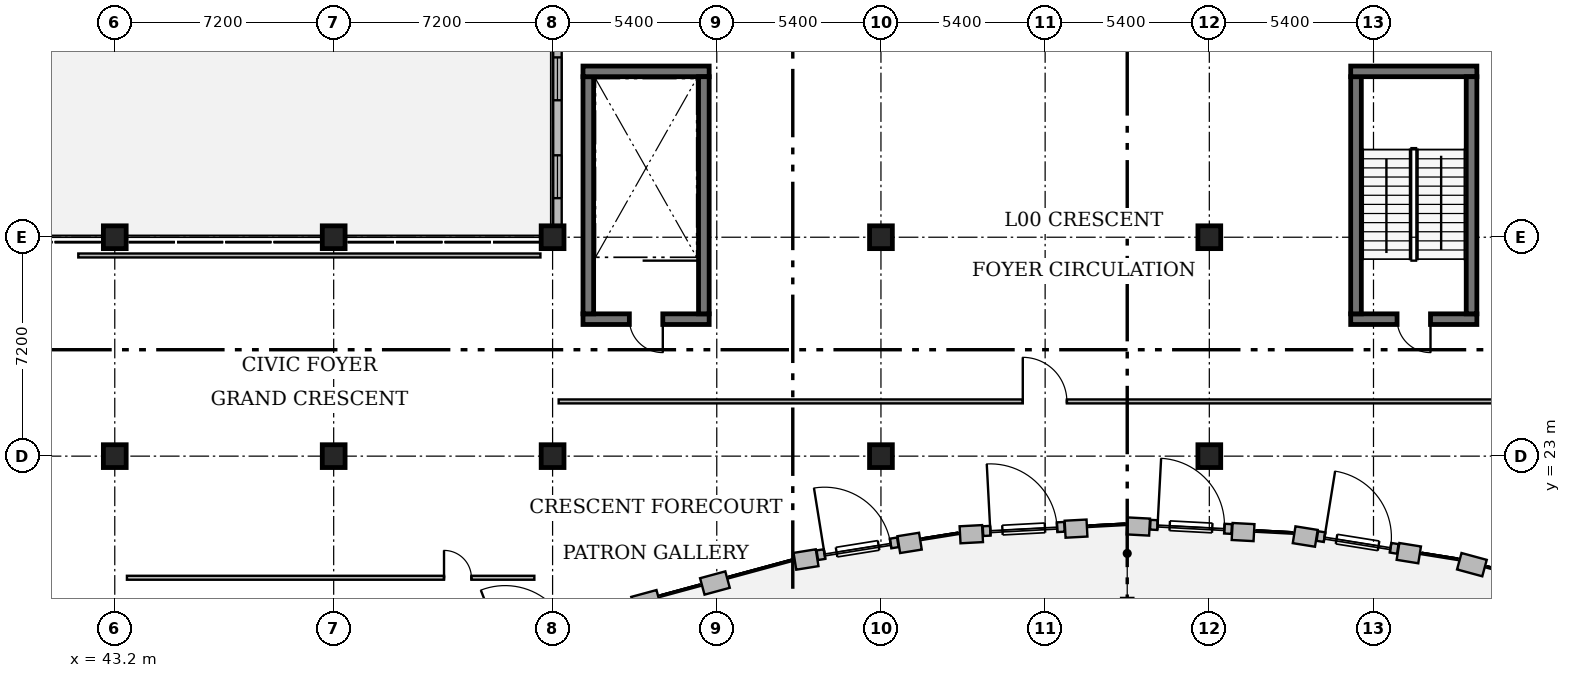
"""IFC4 building model, lengths in metres.
Left out: names, types, materials, properties, quantities, classifications, styles, units other than length and angle.
Written with IfcOpenShell. Run it as: python <this file> out.ifc"""

import sys

from ifc_helpers import new_model, si_unit, direction, frame, frame_2d, origin, origin_2d, place, context, subcontext, project, spatial, rectangle, circle, extrude, element, fill, save


model = new_model("IFC4")
c1 = context("Model", 3, precision=1e-05, world=origin(), true_north=direction((0.0, 1.0)))
c2 = subcontext(c1, "Body", "Model", "MODEL_VIEW")
j1 = project(units=[si_unit("LENGTHUNIT", "METRE"), si_unit("PLANEANGLEUNIT", "RADIAN")], contexts=[c1])
p1 = place(None, origin())
s1 = spatial("IfcSite", under=j1, at=p1, CompositionType="ELEMENT")
p2 = place(p1, origin())
s2 = spatial("IfcBuilding", under=s1, at=p2, CompositionType="ELEMENT")
p3 = place(p2, origin())
s3 = spatial("IfcBuildingStorey", under=s2, at=p3, CompositionType="ELEMENT", Elevation=0.0)
for number, where, z_axis, x_axis in (
    (1, (68.4, 23.0, 0.0), (0.0, 0.0, 1.0), (1.0, 0.0, 0.0)),
    (2, (68.4, 30.2, 0.0), (0.0, 0.0, 1.0), (1.0, 0.0, 0.0)),
    (3, (79.2, 23.0, 0.0), (0.0, 0.0, 1.0), (1.0, 0.0, 0.0)),
    (4, (79.2, 30.2, 0.0), (0.0, 0.0, 1.0), (1.0, 0.0, 0.0)),
    (5, (43.2, 23.0, 0.0), (0.0, 0.0, 1.0), (1.0, 0.0, 0.0)),
    (6, (43.2, 30.2, 0.0), (0.0, 0.0, 1.0), (1.0, 0.0, 0.0)),
    (7, (50.4, 23.0, 0.0), (0.0, 0.0, 1.0), (1.0, 0.0, 0.0)),
    (8, (50.4, 30.2, 0.0), (0.0, 0.0, 1.0), (1.0, 0.0, 0.0)),
    (9, (57.6, 23.0, 0.0), (0.0, 0.0, 1.0), (1.0, 0.0, 0.0)),
    (10, (57.6, 30.2, 0.0), (0.0, 0.0, 1.0), (1.0, 0.0, 0.0)),
):
    element("IfcColumn", number, at=place(p3, frame(where, z_axis=z_axis, x_axis=x_axis)), inside=s3, PredefinedType="COLUMN", context=c2, shape_type="SweptSolid", body=[
        extrude(circle(Radius=0.375, at=origin_2d()), origin(), (0.0, 0.0, 1.0), 4.8),
    ])
p4 = place(p3, frame((88.0, 27.505, 0.0), z_axis=(0.0, 0.0, 1.0), x_axis=(-1.0, 0.0, 0.0)))
e11 = element("IfcWall", 11, at=p4, inside=s3, PredefinedType="SOLIDWALL", context=c2, shape_type="SweptSolid", body=[
    extrude(rectangle(XDim=4.15, YDim=0.35, at=frame_2d((2.075, 0.0))), origin(), (0.0, 0.0, 1.0), 4.8),
])
p5 = place(p4, frame((1.525, 0.0, 0.0)))
e12 = element("IfcOpeningElement", 12, at=p5, cuts=e11, PredefinedType="OPENING", context=c2, shape_type="SweptSolid", body=[
    extrude(rectangle(XDim=1.1, YDim=2.15, at=frame_2d((0.55, 1.075))), frame((0.0, 0.195, 0.0), z_axis=(0.0, -1.0, 0.0), x_axis=(1.0, 0.0, 0.0)), (0.0, 0.0, 1.0), 0.39),
])
p6 = place(p3, frame((84.025, 27.68, 0.0), z_axis=(0.0, 0.0, 1.0), x_axis=(0.0, 1.0, 0.0)))
e13 = element("IfcWall", 13, at=p6, inside=s3, PredefinedType="SOLIDWALL", context=c2, shape_type="SweptSolid", body=[
    extrude(rectangle(XDim=7.8, YDim=0.35, at=frame_2d((3.9, 0.0))), origin(), (0.0, 0.0, 1.0), 4.8),
])
p7 = place(p3, frame((83.85, 35.655, 0.0), z_axis=(0.0, 0.0, 1.0), x_axis=(1.0, 0.0, 0.0)))
e14 = element("IfcWall", 14, at=p7, inside=s3, PredefinedType="SOLIDWALL", context=c2, shape_type="SweptSolid", body=[
    extrude(rectangle(XDim=4.15, YDim=0.35, at=frame_2d((2.075, 0.0))), origin(), (0.0, 0.0, 1.0), 4.8),
])
p8 = place(p3, frame((87.825, 35.48, 0.0), z_axis=(0.0, 0.0, 1.0), x_axis=(0.0, -1.0, 0.0)))
e15 = element("IfcWall", 15, at=p8, inside=s3, PredefinedType="SOLIDWALL", context=c2, shape_type="SweptSolid", body=[
    extrude(rectangle(XDim=7.8, YDim=0.35, at=frame_2d((3.9, 0.0))), origin(), (0.0, 0.0, 1.0), 4.8),
])
p9 = place(p3, frame((62.75, 27.505, 0.0), z_axis=(0.0, 0.0, 1.0), x_axis=(-1.0, 0.0, 0.0)))
e16 = element("IfcWall", 16, at=p9, inside=s3, PredefinedType="SOLIDWALL", context=c2, shape_type="SweptSolid", body=[
    extrude(rectangle(XDim=4.15, YDim=0.35, at=frame_2d((2.075, 0.0))), origin(), (0.0, 0.0, 1.0), 4.54),
])
p10 = place(p9, frame((1.525, 0.0, 0.0)))
e17 = element("IfcOpeningElement", 17, at=p10, cuts=e16, PredefinedType="OPENING", context=c2, shape_type="SweptSolid", body=[
    extrude(rectangle(XDim=1.1, YDim=2.15, at=frame_2d((0.55, 1.075))), frame((0.0, 0.195, 0.0), z_axis=(0.0, -1.0, 0.0), x_axis=(1.0, 0.0, 0.0)), (0.0, 0.0, 1.0), 0.39),
])
p11 = place(p3, frame((58.775, 27.68, 0.0), z_axis=(0.0, 0.0, 1.0), x_axis=(0.0, 1.0, 0.0)))
e18 = element("IfcWall", 18, at=p11, inside=s3, PredefinedType="SOLIDWALL", context=c2, shape_type="SweptSolid", body=[
    extrude(rectangle(XDim=7.8, YDim=0.35, at=frame_2d((3.9, 0.0))), origin(), (0.0, 0.0, 1.0), 4.54),
])
p12 = place(p3, frame((58.6, 35.655, 0.0), z_axis=(0.0, 0.0, 1.0), x_axis=(1.0, 0.0, 0.0)))
e19 = element("IfcWall", 19, at=p12, inside=s3, PredefinedType="SOLIDWALL", context=c2, shape_type="SweptSolid", body=[
    extrude(rectangle(XDim=4.15, YDim=0.35, at=frame_2d((2.075, 0.0))), origin(), (0.0, 0.0, 1.0), 4.54),
])
p13 = place(p3, frame((62.575, 35.48, 0.0), z_axis=(0.0, 0.0, 1.0), x_axis=(0.0, -1.0, 0.0)))
e20 = element("IfcWall", 20, at=p13, inside=s3, PredefinedType="SOLIDWALL", context=c2, shape_type="SweptSolid", body=[
    extrude(rectangle(XDim=7.8, YDim=0.35, at=frame_2d((3.9, 0.0))), origin(), (0.0, 0.0, 1.0), 4.54),
])
p14 = place(p3, frame((60.261, 18.1, 0.0), z_axis=(0.0, 0.0, 1.0), x_axis=(0.965071022865, 0.261988398266, 0.0)))
e21 = element("IfcWall", 21, at=p14, inside=s3, PredefinedType="SOLIDWALL", context=c2, shape_type="SweptSolid", body=[
    extrude(rectangle(XDim=0.86, YDim=0.56, at=frame_2d((0.43, 0.0))), origin(), (0.0, 0.0, 1.0), 4.54),
])
p15 = place(p3, frame((62.524, 18.715, 0.0), z_axis=(0.0, 0.0, 1.0), x_axis=(0.965123305847, 0.261795730506, 0.0)))
e22 = element("IfcWall", 22, at=p15, inside=s3, PredefinedType="SOLIDWALL", context=c2, shape_type="SweptSolid", body=[
    extrude(rectangle(XDim=0.86, YDim=0.56, at=frame_2d((0.43, 0.0))), origin(), (0.0, 0.0, 1.0), 4.54),
])
p16 = place(p3, frame((65.57, 19.542, 0.0), z_axis=(0.0, 0.0, 1.0), x_axis=(0.987374648009, 0.158402349948, 0.0)))
e23 = element("IfcWall", 23, at=p16, inside=s3, PredefinedType="SOLIDWALL", context=c2, shape_type="SweptSolid", body=[
    extrude(rectangle(XDim=0.74, YDim=0.56, at=frame_2d((0.37, 0.0))), origin(), (0.0, 0.0, 1.0), 4.54),
])
p17 = place(p3, frame((68.987, 20.09, 0.0), z_axis=(0.0, 0.0, 1.0), x_axis=(0.98738343789, 0.158347549964, 0.0)))
e24 = element("IfcWall", 24, at=p17, inside=s3, PredefinedType="SOLIDWALL", context=c2, shape_type="SweptSolid", body=[
    extrude(rectangle(XDim=0.72, YDim=0.56, at=frame_2d((0.36, 0.0))), origin(), (0.0, 0.0, 1.0), 4.54),
])
p18 = place(p3, frame((66.308, 19.741, 0.0), z_axis=(0.0, 0.0, 1.0), x_axis=(0.987384856389, 0.158338704595, 0.0)))
e25 = element("IfcWall", 25, at=p18, inside=s3, PredefinedType="SOLIDWALL", context=c2, shape_type="SweptSolid", body=[
    extrude(rectangle(XDim=2.68, YDim=0.32, at=frame_2d((1.34, 0.0))), origin(), (0.0, 0.0, 1.0), 4.54),
])
p19 = place(p18, frame((0.64, 0.0, 2.58)))
e26 = element("IfcOpeningElement", 26, at=p19, cuts=e25, PredefinedType="OPENING", context=c2, shape_type="SweptSolid", body=[
    extrude(rectangle(XDim=1.4, YDim=1.8, at=frame_2d((0.7, 0.9))), frame((0.0, 0.18, 0.0), z_axis=(0.0, -1.0, 0.0), x_axis=(1.0, 0.0, 0.0)), (0.0, 0.0, 1.0), 0.36),
])
p20 = place(p18, frame((0.24, 0.0, 0.0)))
e27 = element("IfcOpeningElement", 27, at=p20, cuts=e25, PredefinedType="OPENING", context=c2, shape_type="SweptSolid", body=[
    extrude(rectangle(XDim=2.2, YDim=2.5, at=frame_2d((1.1, 1.25))), frame((0.0, 0.18, 0.0), z_axis=(0.0, -1.0, 0.0), x_axis=(1.0, 0.0, 0.0)), (0.0, 0.0, 1.0), 0.36),
])
p21 = place(p3, frame((71.002, 20.413, 0.0), z_axis=(0.0, 0.0, 1.0), x_axis=(0.998588513738, 0.053112900797, 0.0)))
e28 = element("IfcWall", 28, at=p21, inside=s3, PredefinedType="SOLIDWALL", context=c2, shape_type="SweptSolid", body=[
    extrude(rectangle(XDim=0.74, YDim=0.56, at=frame_2d((0.37, 0.0))), origin(), (0.0, 0.0, 1.0), 4.54),
])
p22 = place(p3, frame((74.457, 20.596, 0.0), z_axis=(0.0, 0.0, 1.0), x_axis=(0.998582006611, 0.05323510188, 0.0)))
e29 = element("IfcWall", 29, at=p22, inside=s3, PredefinedType="SOLIDWALL", context=c2, shape_type="SweptSolid", body=[
    extrude(rectangle(XDim=0.72, YDim=0.56, at=frame_2d((0.36, 0.0))), origin(), (0.0, 0.0, 1.0), 4.54),
])
p23 = place(p3, frame((71.757, 20.533, 0.0), z_axis=(0.0, 0.0, 1.0), x_axis=(0.998598384616, 0.052926989734, 0.0)))
e30 = element("IfcWall", 30, at=p23, inside=s3, PredefinedType="SOLIDWALL", context=c2, shape_type="SweptSolid", body=[
    extrude(rectangle(XDim=2.68, YDim=0.32, at=frame_2d((1.34, 0.0))), origin(), (0.0, 0.0, 1.0), 4.54),
])
p24 = place(p23, frame((0.64, 0.0, 2.58)))
e31 = element("IfcOpeningElement", 31, at=p24, cuts=e30, PredefinedType="OPENING", context=c2, shape_type="SweptSolid", body=[
    extrude(rectangle(XDim=1.4, YDim=1.8, at=frame_2d((0.7, 0.9))), frame((0.0, 0.18, 0.0), z_axis=(0.0, -1.0, 0.0), x_axis=(1.0, 0.0, 0.0)), (0.0, 0.0, 1.0), 0.36),
])
p25 = place(p23, frame((0.24, 0.0, 0.0)))
e32 = element("IfcOpeningElement", 32, at=p25, cuts=e30, PredefinedType="OPENING", context=c2, shape_type="SweptSolid", body=[
    extrude(rectangle(XDim=2.2, YDim=2.5, at=frame_2d((1.1, 1.25))), frame((0.0, 0.18, 0.0), z_axis=(0.0, -1.0, 0.0), x_axis=(1.0, 0.0, 0.0)), (0.0, 0.0, 1.0), 0.36),
])
p26 = place(p3, frame((76.496, 20.705, 0.0), z_axis=(0.0, 0.0, 1.0), x_axis=(0.99860503714, -0.052801323841, 0.0)))
e33 = element("IfcWall", 33, at=p26, inside=s3, PredefinedType="SOLIDWALL", context=c2, shape_type="SweptSolid", body=[
    extrude(rectangle(XDim=0.74, YDim=0.56, at=frame_2d((0.37, 0.0))), origin(), (0.0, 0.0, 1.0), 4.54),
])
p27 = place(p3, frame((79.951, 20.522, 0.0), z_axis=(0.0, 0.0, 1.0), x_axis=(0.998599974898, -0.052896976599, 0.0)))
e34 = element("IfcWall", 34, at=p27, inside=s3, PredefinedType="SOLIDWALL", context=c2, shape_type="SweptSolid", body=[
    extrude(rectangle(XDim=0.72, YDim=0.56, at=frame_2d((0.36, 0.0))), origin(), (0.0, 0.0, 1.0), 4.54),
])
p28 = place(p3, frame((77.259, 20.745, 0.0), z_axis=(0.0, 0.0, 1.0), x_axis=(0.998598639766, -0.052922175472, 0.0)))
e35 = element("IfcWall", 35, at=p28, inside=s3, PredefinedType="SOLIDWALL", context=c2, shape_type="SweptSolid", body=[
    extrude(rectangle(XDim=2.68, YDim=0.32, at=frame_2d((1.34, 0.0))), origin(), (0.0, 0.0, 1.0), 4.54),
])
p29 = place(p28, frame((0.64, 0.0, 2.58)))
e36 = element("IfcOpeningElement", 36, at=p29, cuts=e35, PredefinedType="OPENING", context=c2, shape_type="SweptSolid", body=[
    extrude(rectangle(XDim=1.4, YDim=1.8, at=frame_2d((0.7, 0.9))), frame((0.0, 0.18, 0.0), z_axis=(0.0, -1.0, 0.0), x_axis=(1.0, 0.0, 0.0)), (0.0, 0.0, 1.0), 0.36),
])
p30 = place(p28, frame((0.24, 0.0, 0.0)))
e37 = element("IfcOpeningElement", 37, at=p30, cuts=e35, PredefinedType="OPENING", context=c2, shape_type="SweptSolid", body=[
    extrude(rectangle(XDim=2.2, YDim=2.5, at=frame_2d((1.1, 1.25))), frame((0.0, 0.18, 0.0), z_axis=(0.0, -1.0, 0.0), x_axis=(1.0, 0.0, 0.0)), (0.0, 0.0, 1.0), 0.36),
])
p31 = place(p3, frame((81.99, 20.414, 0.0), z_axis=(0.0, 0.0, 1.0), x_axis=(0.987382924217, -0.158350752965, 0.0)))
e38 = element("IfcWall", 38, at=p31, inside=s3, PredefinedType="SOLIDWALL", context=c2, shape_type="SweptSolid", body=[
    extrude(rectangle(XDim=0.74, YDim=0.56, at=frame_2d((0.37, 0.0))), origin(), (0.0, 0.0, 1.0), 4.54),
])
p32 = place(p3, frame((85.406, 19.866, 0.0), z_axis=(0.0, 0.0, 1.0), x_axis=(0.98738343789, -0.158347549964, 0.0)))
e39 = element("IfcWall", 39, at=p32, inside=s3, PredefinedType="SOLIDWALL", context=c2, shape_type="SweptSolid", body=[
    extrude(rectangle(XDim=0.72, YDim=0.56, at=frame_2d((0.36, 0.0))), origin(), (0.0, 0.0, 1.0), 4.54),
])
p33 = place(p3, frame((82.752, 20.373, 0.0), z_axis=(0.0, 0.0, 1.0), x_axis=(0.987387140162, -0.158324462552, 0.0)))
e40 = element("IfcWall", 40, at=p33, inside=s3, PredefinedType="SOLIDWALL", context=c2, shape_type="SweptSolid", body=[
    extrude(rectangle(XDim=2.68, YDim=0.32, at=frame_2d((1.34, 0.0))), origin(), (0.0, 0.0, 1.0), 4.54),
])
p34 = place(p33, frame((0.64, 0.0, 2.58)))
e41 = element("IfcOpeningElement", 41, at=p34, cuts=e40, PredefinedType="OPENING", context=c2, shape_type="SweptSolid", body=[
    extrude(rectangle(XDim=1.4, YDim=1.8, at=frame_2d((0.7, 0.9))), frame((0.0, 0.18, 0.0), z_axis=(0.0, -1.0, 0.0), x_axis=(1.0, 0.0, 0.0)), (0.0, 0.0, 1.0), 0.36),
])
p35 = place(p33, frame((0.24, 0.0, 0.0)))
e42 = element("IfcOpeningElement", 42, at=p35, cuts=e40, PredefinedType="OPENING", context=c2, shape_type="SweptSolid", body=[
    extrude(rectangle(XDim=2.2, YDim=2.5, at=frame_2d((1.1, 1.25))), frame((0.0, 0.18, 0.0), z_axis=(0.0, -1.0, 0.0), x_axis=(1.0, 0.0, 0.0)), (0.0, 0.0, 1.0), 0.36),
])
p36 = place(p3, frame((87.421, 19.543, 0.0), z_axis=(0.0, 0.0, 1.0), x_axis=(0.965071022865, -0.261988398266, 0.0)))
e43 = element("IfcWall", 43, at=p36, inside=s3, PredefinedType="SOLIDWALL", context=c2, shape_type="SweptSolid", body=[
    extrude(rectangle(XDim=0.86, YDim=0.56, at=frame_2d((0.43, 0.0))), origin(), (0.0, 0.0, 1.0), 4.54),
])
p37 = place(p3, frame((57.76, 30.58, 0.0), z_axis=(0.0, 0.0, 1.0), x_axis=(0.0, 1.0, 0.0)))
e44 = element("IfcWall", 44, at=p37, inside=s3, PredefinedType="SOLIDWALL", context=c2, shape_type="SweptSolid", body=[
    extrude(rectangle(XDim=6.44, YDim=0.28, at=frame_2d((3.22, 0.0))), origin(), (0.0, 0.0, 1.0), 3.873),
])
p38 = place(p37, frame((0.905, 0.0, 0.95)))
e45 = element("IfcOpeningElement", 45, at=p38, cuts=e44, PredefinedType="OPENING", context=c2, shape_type="SweptSolid", body=[
    extrude(rectangle(XDim=1.41, YDim=1.95, at=frame_2d((0.705, 0.975))), frame((0.0, 0.16, 0.0), z_axis=(0.0, -1.0, 0.0), x_axis=(1.0, 0.0, 0.0)), (0.0, 0.0, 1.0), 0.32),
])
p39 = place(p37, frame((4.125, 0.0, 0.95)))
e46 = element("IfcOpeningElement", 46, at=p39, cuts=e44, PredefinedType="OPENING", context=c2, shape_type="SweptSolid", body=[
    extrude(rectangle(XDim=1.41, YDim=1.95, at=frame_2d((0.705, 0.975))), frame((0.0, 0.16, 0.0), z_axis=(0.0, -1.0, 0.0), x_axis=(1.0, 0.0, 0.0)), (0.0, 0.0, 1.0), 0.32),
])
p40 = place(p3, frame((42.0, 29.6, 0.0), z_axis=(0.0, 0.0, 1.0), x_axis=(1.0, 0.0, 0.0)))
e47 = element("IfcWall", 47, at=p40, inside=s3, PredefinedType="PARTITIONING", context=c2, shape_type="SweptSolid", body=[
    extrude(rectangle(XDim=15.2, YDim=0.13, at=frame_2d((7.6, 0.0))), origin(), (0.0, 0.0, 1.0), 4.54),
])
p41 = place(p3, frame((43.6, 19.0, 0.0), z_axis=(0.0, 0.0, 1.0), x_axis=(1.0, 0.0, 0.0)))
e48 = element("IfcWall", 48, at=p41, inside=s3, PredefinedType="PARTITIONING", context=c2, shape_type="SweptSolid", body=[
    extrude(rectangle(XDim=13.4, YDim=0.13, at=frame_2d((6.7, 0.0))), origin(), (0.0, 0.0, 1.0), 4.54),
])
p42 = place(p41, frame((10.429, 0.0, 0.0)))
e49 = element("IfcOpeningElement", 49, at=p42, cuts=e48, PredefinedType="OPENING", context=c2, shape_type="SweptSolid", body=[
    extrude(rectangle(XDim=0.9, YDim=2.15, at=frame_2d((0.45, 1.075))), frame((0.0, 0.085, 0.0), z_axis=(0.0, -1.0, 0.0), x_axis=(1.0, 0.0, 0.0)), (0.0, 0.0, 1.0), 0.17),
])
p43 = place(p3, frame((57.8, 24.8, 0.0), z_axis=(0.0, 0.0, 1.0), x_axis=(1.0, 0.0, 0.0)))
e50 = element("IfcWall", 50, at=p43, inside=s3, PredefinedType="PARTITIONING", context=c2, shape_type="SweptSolid", body=[
    extrude(rectangle(XDim=37.2, YDim=0.13, at=frame_2d((18.6, 0.0))), origin(), (0.0, 0.0, 1.0), 4.54),
])
p44 = place(p43, frame((15.265, 0.0, 0.0)))
e51 = element("IfcOpeningElement", 51, at=p44, cuts=e50, PredefinedType="OPENING", context=c2, shape_type="SweptSolid", body=[
    extrude(rectangle(XDim=1.45, YDim=2.2, at=frame_2d((0.725, 1.1))), frame((0.0, 0.085, 0.0), z_axis=(0.0, -1.0, 0.0), x_axis=(1.0, 0.0, 0.0)), (0.0, 0.0, 1.0), 0.17),
])
p45 = place(p5, origin())
e52 = element("IfcDoor", 52, at=p45, inside=s3, OperationType="SINGLE_SWING_LEFT", PredefinedType="DOOR", context=c2, shape_type="SweptSolid", body=[
    extrude(rectangle(XDim=1.1, YDim=2.15, at=frame_2d((0.55, 1.075))), frame((0.0, 0.025, 0.0), z_axis=(0.0, -1.0, 0.0), x_axis=(1.0, 0.0, 0.0)), (0.0, 0.0, 1.0), 0.05),
])
fill(e12, e52)
p46 = place(p10, origin())
e53 = element("IfcDoor", 53, at=p46, inside=s3, OperationType="SINGLE_SWING_LEFT", PredefinedType="DOOR", context=c2, shape_type="SweptSolid", body=[
    extrude(rectangle(XDim=1.1, YDim=2.15, at=frame_2d((0.55, 1.075))), frame((0.0, 0.025, 0.0), z_axis=(0.0, -1.0, 0.0), x_axis=(1.0, 0.0, 0.0)), (0.0, 0.0, 1.0), 0.05),
])
fill(e17, e53)
p47 = place(p19, origin())
e54 = element("IfcWindow", 54, at=p47, inside=s3, PartitioningType="SINGLE_PANEL", PredefinedType="WINDOW", context=c2, shape_type="SweptSolid", body=[
    extrude(rectangle(XDim=1.4, YDim=1.8, at=frame_2d((0.7, 0.9))), frame((0.0, 0.03, 0.0), z_axis=(0.0, -1.0, 0.0), x_axis=(1.0, 0.0, 0.0)), (0.0, 0.0, 1.0), 0.06),
])
fill(e26, e54)
p48 = place(p20, origin())
e55 = element("IfcDoor", 55, at=p48, inside=s3, OperationType="SINGLE_SWING_LEFT", PredefinedType="DOOR", context=c2, shape_type="SweptSolid", body=[
    extrude(rectangle(XDim=2.2, YDim=2.5, at=frame_2d((1.1, 1.25))), frame((0.0, 0.025, 0.0), z_axis=(0.0, -1.0, 0.0), x_axis=(1.0, 0.0, 0.0)), (0.0, 0.0, 1.0), 0.05),
])
fill(e27, e55)
p49 = place(p24, origin())
e56 = element("IfcWindow", 56, at=p49, inside=s3, PartitioningType="SINGLE_PANEL", PredefinedType="WINDOW", context=c2, shape_type="SweptSolid", body=[
    extrude(rectangle(XDim=1.4, YDim=1.8, at=frame_2d((0.7, 0.9))), frame((0.0, 0.03, 0.0), z_axis=(0.0, -1.0, 0.0), x_axis=(1.0, 0.0, 0.0)), (0.0, 0.0, 1.0), 0.06),
])
fill(e31, e56)
p50 = place(p25, origin())
e57 = element("IfcDoor", 57, at=p50, inside=s3, OperationType="SINGLE_SWING_LEFT", PredefinedType="DOOR", context=c2, shape_type="SweptSolid", body=[
    extrude(rectangle(XDim=2.2, YDim=2.5, at=frame_2d((1.1, 1.25))), frame((0.0, 0.025, 0.0), z_axis=(0.0, -1.0, 0.0), x_axis=(1.0, 0.0, 0.0)), (0.0, 0.0, 1.0), 0.05),
])
fill(e32, e57)
p51 = place(p29, origin())
e58 = element("IfcWindow", 58, at=p51, inside=s3, PartitioningType="SINGLE_PANEL", PredefinedType="WINDOW", context=c2, shape_type="SweptSolid", body=[
    extrude(rectangle(XDim=1.4, YDim=1.8, at=frame_2d((0.7, 0.9))), frame((0.0, 0.03, 0.0), z_axis=(0.0, -1.0, 0.0), x_axis=(1.0, 0.0, 0.0)), (0.0, 0.0, 1.0), 0.06),
])
fill(e36, e58)
p52 = place(p30, origin())
e59 = element("IfcDoor", 59, at=p52, inside=s3, OperationType="SINGLE_SWING_LEFT", PredefinedType="DOOR", context=c2, shape_type="SweptSolid", body=[
    extrude(rectangle(XDim=2.2, YDim=2.5, at=frame_2d((1.1, 1.25))), frame((0.0, 0.025, 0.0), z_axis=(0.0, -1.0, 0.0), x_axis=(1.0, 0.0, 0.0)), (0.0, 0.0, 1.0), 0.05),
])
fill(e37, e59)
p53 = place(p34, origin())
e60 = element("IfcWindow", 60, at=p53, inside=s3, PartitioningType="SINGLE_PANEL", PredefinedType="WINDOW", context=c2, shape_type="SweptSolid", body=[
    extrude(rectangle(XDim=1.4, YDim=1.8, at=frame_2d((0.7, 0.9))), frame((0.0, 0.03, 0.0), z_axis=(0.0, -1.0, 0.0), x_axis=(1.0, 0.0, 0.0)), (0.0, 0.0, 1.0), 0.06),
])
fill(e41, e60)
p54 = place(p35, origin())
e61 = element("IfcDoor", 61, at=p54, inside=s3, OperationType="SINGLE_SWING_LEFT", PredefinedType="DOOR", context=c2, shape_type="SweptSolid", body=[
    extrude(rectangle(XDim=2.2, YDim=2.5, at=frame_2d((1.1, 1.25))), frame((0.0, 0.025, 0.0), z_axis=(0.0, -1.0, 0.0), x_axis=(1.0, 0.0, 0.0)), (0.0, 0.0, 1.0), 0.05),
])
fill(e42, e61)
p55 = place(p38, origin())
e62 = element("IfcWindow", 62, at=p55, inside=s3, PartitioningType="SINGLE_PANEL", PredefinedType="WINDOW", context=c2, shape_type="SweptSolid", body=[
    extrude(rectangle(XDim=1.41, YDim=1.95, at=frame_2d((0.705, 0.975))), frame((0.0, 0.03, 0.0), z_axis=(0.0, -1.0, 0.0), x_axis=(1.0, 0.0, 0.0)), (0.0, 0.0, 1.0), 0.06),
])
fill(e45, e62)
p56 = place(p39, origin())
e63 = element("IfcWindow", 63, at=p56, inside=s3, PartitioningType="SINGLE_PANEL", PredefinedType="WINDOW", context=c2, shape_type="SweptSolid", body=[
    extrude(rectangle(XDim=1.41, YDim=1.95, at=frame_2d((0.705, 0.975))), frame((0.0, 0.03, 0.0), z_axis=(0.0, -1.0, 0.0), x_axis=(1.0, 0.0, 0.0)), (0.0, 0.0, 1.0), 0.06),
])
fill(e46, e63)
p57 = place(p42, origin())
e64 = element("IfcDoor", 64, at=p57, inside=s3, OperationType="SINGLE_SWING_LEFT", PredefinedType="DOOR", context=c2, shape_type="SweptSolid", body=[
    extrude(rectangle(XDim=0.9, YDim=2.15, at=frame_2d((0.45, 1.075))), frame((0.0, 0.025, 0.0), z_axis=(0.0, -1.0, 0.0), x_axis=(1.0, 0.0, 0.0)), (0.0, 0.0, 1.0), 0.05),
])
fill(e49, e64)
p58 = place(p44, origin())
e65 = element("IfcDoor", 65, at=p58, inside=s3, OperationType="DOUBLE_DOOR_SINGLE_SWING", PredefinedType="DOOR", context=c2, shape_type="SweptSolid", body=[
    extrude(rectangle(XDim=1.45, YDim=2.2, at=frame_2d((0.725, 1.1))), frame((0.0, 0.025, 0.0), z_axis=(0.0, -1.0, 0.0), x_axis=(1.0, 0.0, 0.0)), (0.0, 0.0, 1.0), 0.05),
])
fill(e51, e65)
save(model, sys.argv[1])
